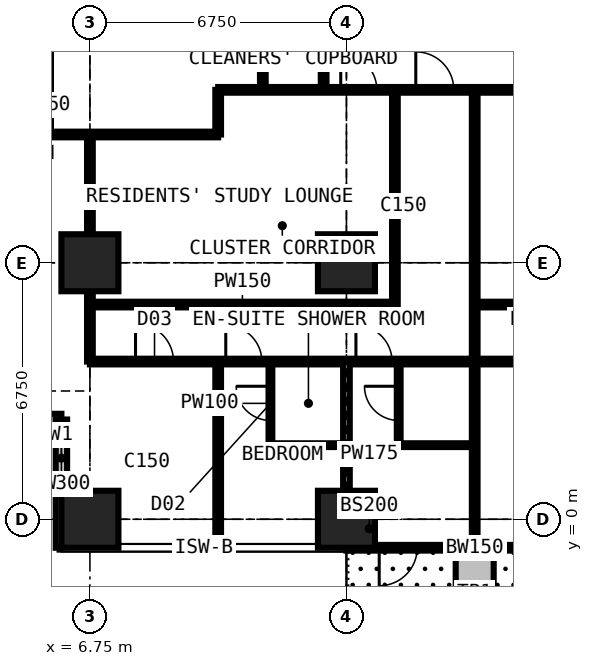
"""IFC4 building model, lengths in metres.
Left out: names, types, materials, properties, quantities, classifications, styles, units other than length and angle.
Written with IfcOpenShell. Run it as: python <this file> out.ifc"""

import sys

from ifc_helpers import new_model, si_unit, direction, frame, frame_2d, origin, origin_2d, place, context, subcontext, project, spatial, rectangle, extrude, element, fill, save


model = new_model("IFC4")
c1 = context("Model", 3, precision=1e-05, world=origin(), true_north=direction((0.0, 1.0)))
c2 = subcontext(c1, "Body", "Model", "MODEL_VIEW")
j1 = project(units=[si_unit("LENGTHUNIT", "METRE"), si_unit("PLANEANGLEUNIT", "RADIAN")], contexts=[c1])
p1 = place(None, origin())
s1 = spatial("IfcSite", under=j1, at=p1, CompositionType="ELEMENT")
p2 = place(p1, origin())
s2 = spatial("IfcBuilding", under=s1, at=p2, CompositionType="ELEMENT")
p3 = place(p2, frame((0.0, 0.0, 130.5)))
s3 = spatial("IfcBuildingStorey", under=s2, at=p3, CompositionType="ELEMENT", Elevation=130.5)
for number, where, z_axis, x_axis in (
    (1, (6.75, 0.0, 0.0), (0.0, 0.0, 1.0), (1.0, 0.0, 0.0)),
    (2, (6.75, 6.75, 0.0), (0.0, 0.0, 1.0), (1.0, 0.0, 0.0)),
    (3, (13.5, 0.0, 0.0), (0.0, 0.0, 1.0), (1.0, 0.0, 0.0)),
    (4, (13.5, 6.75, 0.0), (0.0, 0.0, 1.0), (1.0, 0.0, 0.0)),
):
    element("IfcColumn", number, at=place(p3, frame(where, z_axis=z_axis, x_axis=x_axis)), inside=s3, PredefinedType="COLUMN", context=c2, shape_type="SweptSolid", body=[
        extrude(rectangle(XDim=1.5, YDim=1.5, at=origin_2d()), origin(), (0.0, 0.0, 1.0), 3.6),
    ])
p4 = place(p3, frame((2.625, 2.625, 0.0), z_axis=(0.0, 0.0, 1.0), x_axis=(1.0, 0.0, 0.0)))
e5 = element("IfcWall", 5, at=p4, inside=s3, PredefinedType="SOLIDWALL", context=c2, shape_type="SweptSolid", body=[
    extrude(rectangle(XDim=3.375, YDim=0.3, at=frame_2d((1.688, 0.0))), origin(), (0.0, 0.0, 1.0), 3.375),
])
p5 = place(p4, frame((0.788, 0.0, 0.6)))
e6 = element("IfcOpeningElement", 6, at=p5, cuts=e5, PredefinedType="OPENING", context=c2, shape_type="SweptSolid", body=[
    extrude(rectangle(XDim=1.8, YDim=2.1, at=frame_2d((0.9, 1.05))), frame((0.0, 0.16, 0.0), z_axis=(0.0, -1.0, 0.0), x_axis=(1.0, 0.0, 0.0)), (0.0, 0.0, 1.0), 0.32),
])
p6 = place(p3, frame((6.0, 2.625, 0.0), z_axis=(0.0, 0.0, 1.0), x_axis=(0.0, -1.0, 0.0)))
e7 = element("IfcWall", 7, at=p6, inside=s3, PredefinedType="SOLIDWALL", context=c2, shape_type="SweptSolid", body=[
    extrude(rectangle(XDim=3.375, YDim=0.3, at=frame_2d((1.688, 0.0))), origin(), (0.0, 0.0, 1.0), 3.375),
])
p7 = place(p6, frame((0.268, 0.0, 0.9)))
e8 = element("IfcOpeningElement", 8, at=p7, cuts=e7, PredefinedType="OPENING", context=c2, shape_type="SweptSolid", body=[
    extrude(rectangle(XDim=1.5, YDim=1.8, at=frame_2d((0.75, 0.9))), frame((0.0, 0.16, 0.0), z_axis=(0.0, -1.0, 0.0), x_axis=(1.0, 0.0, 0.0)), (0.0, 0.0, 1.0), 0.32),
])
p8 = place(p3, frame((20.25, -0.75, 0.0), z_axis=(0.0, 0.0, 1.0), x_axis=(-1.0, 0.0, 0.0)))
e9 = element("IfcWall", 9, at=p8, inside=s3, PredefinedType="SOLIDWALL", context=c2, shape_type="SweptSolid", body=[
    extrude(rectangle(XDim=6.75, YDim=0.15, at=frame_2d((3.375, 0.0))), origin(), (0.0, 0.0, 1.0), 3.375),
])
p9 = place(p8, frame((0.863, 0.0, 0.0)))
e10 = element("IfcOpeningElement", 10, at=p9, cuts=e9, PredefinedType="OPENING", context=c2, shape_type="SweptSolid", body=[
    extrude(rectangle(XDim=1.0, YDim=2.2, at=frame_2d((0.5, 1.1))), frame((0.0, 0.085, 0.0), z_axis=(0.0, -1.0, 0.0), x_axis=(1.0, 0.0, 0.0)), (0.0, 0.0, 1.0), 0.17),
])
p10 = place(p8, frame((1.975, 0.0, 0.9)))
e11 = element("IfcOpeningElement", 11, at=p10, cuts=e9, PredefinedType="OPENING", context=c2, shape_type="SweptSolid", body=[
    extrude(rectangle(XDim=1.2, YDim=1.8, at=frame_2d((0.6, 0.9))), frame((0.0, 0.085, 0.0), z_axis=(0.0, -1.0, 0.0), x_axis=(1.0, 0.0, 0.0)), (0.0, 0.0, 1.0), 0.17),
])
p11 = place(p8, frame((4.887, 0.0, 0.0)))
e12 = element("IfcOpeningElement", 12, at=p11, cuts=e9, PredefinedType="OPENING", context=c2, shape_type="SweptSolid", body=[
    extrude(rectangle(XDim=1.0, YDim=2.2, at=frame_2d((0.5, 1.1))), frame((0.0, 0.085, 0.0), z_axis=(0.0, -1.0, 0.0), x_axis=(1.0, 0.0, 0.0)), (0.0, 0.0, 1.0), 0.17),
])
p12 = place(p8, frame((3.575, 0.0, 0.9)))
e13 = element("IfcOpeningElement", 13, at=p12, cuts=e9, PredefinedType="OPENING", context=c2, shape_type="SweptSolid", body=[
    extrude(rectangle(XDim=1.2, YDim=1.8, at=frame_2d((0.6, 0.9))), frame((0.0, 0.085, 0.0), z_axis=(0.0, -1.0, 0.0), x_axis=(1.0, 0.0, 0.0)), (0.0, 0.0, 1.0), 0.17),
])
p13 = place(p3, frame((16.875, -0.85, 0.0), z_axis=(0.0, 0.0, 1.0), x_axis=(0.0, -1.0, 0.0)))
e14 = element("IfcWall", 14, at=p13, inside=s3, PredefinedType="USERDEFINED", context=c2, shape_type="SweptSolid", body=[
    extrude(rectangle(XDim=2.2, YDim=1.0, at=frame_2d((1.1, 0.0))), origin(), (0.0, 0.0, 1.0), 0.9),
])
p14 = place(p3, frame((-0.734, 10.125, 0.0), z_axis=(0.0, 0.0, 1.0), x_axis=(1.0, 0.0, 0.0)))
e15 = element("IfcWall", 15, at=p14, inside=s3, PredefinedType="PARTITIONING", context=c2, shape_type="SweptSolid", body=[
    extrude(rectangle(XDim=10.859, YDim=0.15, at=frame_2d((5.429, 0.0))), origin(), (0.0, 0.0, 1.0), 3.375),
])
p15 = place(p3, frame((6.75, 4.15, 0.0), z_axis=(0.0, 0.0, 1.0), x_axis=(0.0, 1.0, 0.0)))
e16 = element("IfcWall", 16, at=p15, inside=s3, PredefinedType="PARTITIONING", context=c2, shape_type="SweptSolid", body=[
    extrude(rectangle(XDim=5.975, YDim=0.15, at=frame_2d((2.988, 0.0))), origin(), (0.0, 0.0, 1.0), 2.877),
])
p16 = place(p3, frame((6.75, 4.15, 0.0), z_axis=(0.0, 0.0, 1.0), x_axis=(1.0, 0.0, 0.0)))
e17 = element("IfcWall", 17, at=p16, inside=s3, PredefinedType="PARTITIONING", context=c2, shape_type="SweptSolid", body=[
    extrude(rectangle(XDim=23.625, YDim=0.15, at=frame_2d((11.812, 0.0))), origin(), (0.0, 0.0, 1.0), 3.375),
])
p17 = place(p16, frame((1.2, 0.0, 0.0)))
e18 = element("IfcOpeningElement", 18, at=p17, cuts=e17, PredefinedType="OPENING", context=c2, shape_type="SweptSolid", body=[
    extrude(rectangle(XDim=1.0, YDim=2.2, at=frame_2d((0.5, 1.1))), frame((0.0, 0.085, 0.0), z_axis=(0.0, -1.0, 0.0), x_axis=(1.0, 0.0, 0.0)), (0.0, 0.0, 1.0), 0.17),
])
p18 = place(p16, frame((3.575, 0.0, 0.0)))
e19 = element("IfcOpeningElement", 19, at=p18, cuts=e17, PredefinedType="OPENING", context=c2, shape_type="SweptSolid", body=[
    extrude(rectangle(XDim=0.95, YDim=2.2, at=frame_2d((0.475, 1.1))), frame((0.0, 0.085, 0.0), z_axis=(0.0, -1.0, 0.0), x_axis=(1.0, 0.0, 0.0)), (0.0, 0.0, 1.0), 0.17),
])
p19 = place(p16, frame((7.0, 0.0, 0.0)))
e20 = element("IfcOpeningElement", 20, at=p19, cuts=e17, PredefinedType="OPENING", context=c2, shape_type="SweptSolid", body=[
    extrude(rectangle(XDim=0.95, YDim=2.2, at=frame_2d((0.475, 1.1))), frame((0.0, 0.085, 0.0), z_axis=(0.0, -1.0, 0.0), x_axis=(1.0, 0.0, 0.0)), (0.0, 0.0, 1.0), 0.17),
])
p20 = place(p16, frame((18.475, 0.0, 0.0)))
e21 = element("IfcOpeningElement", 21, at=p20, cuts=e17, PredefinedType="OPENING", context=c2, shape_type="SweptSolid", body=[
    extrude(rectangle(XDim=0.95, YDim=2.2, at=frame_2d((0.475, 1.1))), frame((0.0, 0.085, 0.0), z_axis=(0.0, -1.0, 0.0), x_axis=(1.0, 0.0, 0.0)), (0.0, 0.0, 1.0), 0.17),
])
p21 = place(p16, frame((11.725, 0.0, 0.0)))
e22 = element("IfcOpeningElement", 22, at=p21, cuts=e17, PredefinedType="OPENING", context=c2, shape_type="SweptSolid", body=[
    extrude(rectangle(XDim=0.95, YDim=2.2, at=frame_2d((0.475, 1.1))), frame((0.0, 0.085, 0.0), z_axis=(0.0, -1.0, 0.0), x_axis=(1.0, 0.0, 0.0)), (0.0, 0.0, 1.0), 0.17),
])
p22 = place(p3, frame((6.75, 5.65, 0.0), z_axis=(0.0, 0.0, 1.0), x_axis=(1.0, 0.0, 0.0)))
e23 = element("IfcWall", 23, at=p22, inside=s3, PredefinedType="PARTITIONING", context=c2, shape_type="SweptSolid", body=[
    extrude(rectangle(XDim=8.025, YDim=0.15, at=frame_2d((4.012, 0.0))), origin(), (0.0, 0.0, 1.0), 3.375),
])
p23 = place(p3, frame((10.125, -0.734, 0.0), z_axis=(0.0, 0.0, 1.0), x_axis=(0.0, 1.0, 0.0)))
e24 = element("IfcWall", 24, at=p23, inside=s3, PredefinedType="PARTITIONING", context=c2, shape_type="SweptSolid", body=[
    extrude(rectangle(XDim=4.884, YDim=0.15, at=frame_2d((2.442, 0.0))), origin(), (0.0, 0.0, 1.0), 3.375),
])
p24 = place(p3, frame((10.125, 10.125, 0.0), z_axis=(0.0, 0.0, 1.0), x_axis=(0.0, 1.0, 0.0)))
e25 = element("IfcWall", 25, at=p24, inside=s3, PredefinedType="PARTITIONING", context=c2, shape_type="SweptSolid", body=[
    extrude(rectangle(XDim=1.175, YDim=0.15, at=frame_2d((0.587, 0.0))), origin(), (0.0, 0.0, 1.0), 3.375),
])
p25 = place(p3, frame((10.125, 11.3, 0.0), z_axis=(0.0, 0.0, 1.0), x_axis=(1.0, 0.0, 0.0)))
e26 = element("IfcWall", 26, at=p25, inside=s3, PredefinedType="PARTITIONING", context=c2, shape_type="SweptSolid", body=[
    extrude(rectangle(XDim=20.675, YDim=0.15, at=frame_2d((10.337, 0.0))), origin(), (0.0, 0.0, 1.0), 3.375),
])
p26 = place(p25, frame((5.2, 0.0, 0.0)))
e27 = element("IfcOpeningElement", 27, at=p26, cuts=e26, PredefinedType="OPENING", context=c2, shape_type="SweptSolid", body=[
    extrude(rectangle(XDim=1.0, YDim=2.2, at=frame_2d((0.5, 1.1))), frame((0.0, 0.085, 0.0), z_axis=(0.0, -1.0, 0.0), x_axis=(1.0, 0.0, 0.0)), (0.0, 0.0, 1.0), 0.17),
])
p27 = place(p25, frame((11.312, 0.0, 0.0)))
e28 = element("IfcOpeningElement", 28, at=p27, cuts=e26, PredefinedType="OPENING", context=c2, shape_type="SweptSolid", body=[
    extrude(rectangle(XDim=1.0, YDim=2.2, at=frame_2d((0.5, 1.1))), frame((0.0, 0.085, 0.0), z_axis=(0.0, -1.0, 0.0), x_axis=(1.0, 0.0, 0.0)), (0.0, 0.0, 1.0), 0.17),
])
p28 = place(p25, frame((3.225, 0.0, 0.0)))
e29 = element("IfcOpeningElement", 29, at=p28, cuts=e26, PredefinedType="OPENING", context=c2, shape_type="SweptSolid", body=[
    extrude(rectangle(XDim=0.95, YDim=2.2, at=frame_2d((0.475, 1.1))), frame((0.0, 0.085, 0.0), z_axis=(0.0, -1.0, 0.0), x_axis=(1.0, 0.0, 0.0)), (0.0, 0.0, 1.0), 0.17),
])
p29 = place(p3, frame((11.3, 11.3, 0.0), z_axis=(0.0, 0.0, 1.0), x_axis=(0.0, 1.0, 0.0)))
e30 = element("IfcWall", 30, at=p29, inside=s3, PredefinedType="PARTITIONING", context=c2, shape_type="SweptSolid", body=[
    extrude(rectangle(XDim=19.3, YDim=0.15, at=frame_2d((9.65, 0.0))), origin(), (0.0, 0.0, 1.0), 3.375),
])
p30 = place(p29, frame((18.1, 0.0, 0.0)))
e31 = element("IfcOpeningElement", 31, at=p30, cuts=e30, PredefinedType="OPENING", context=c2, shape_type="SweptSolid", body=[
    extrude(rectangle(XDim=1.0, YDim=2.2, at=frame_2d((0.5, 1.1))), frame((0.0, 0.085, 0.0), z_axis=(0.0, -1.0, 0.0), x_axis=(1.0, 0.0, 0.0)), (0.0, 0.0, 1.0), 0.17),
])
p31 = place(p29, frame((10.137, 0.0, 0.0)))
e32 = element("IfcOpeningElement", 32, at=p31, cuts=e30, PredefinedType="OPENING", context=c2, shape_type="SweptSolid", body=[
    extrude(rectangle(XDim=1.0, YDim=2.2, at=frame_2d((0.5, 1.1))), frame((0.0, 0.085, 0.0), z_axis=(0.0, -1.0, 0.0), x_axis=(1.0, 0.0, 0.0)), (0.0, 0.0, 1.0), 0.17),
])
p32 = place(p3, frame((11.5, 1.95, 0.0), z_axis=(0.0, 0.0, 1.0), x_axis=(0.0, 1.0, 0.0)))
e33 = element("IfcWall", 33, at=p32, inside=s3, PredefinedType="PARTITIONING", context=c2, shape_type="SweptSolid", body=[
    extrude(rectangle(XDim=2.2, YDim=0.1, at=frame_2d((1.1, 0.0))), origin(), (0.0, 0.0, 1.0), 3.375),
])
p33 = place(p32, frame((0.65, 0.0, 0.0)))
e34 = element("IfcOpeningElement", 34, at=p33, cuts=e33, PredefinedType="OPENING", context=c2, shape_type="SweptSolid", body=[
    extrude(rectangle(XDim=0.9, YDim=2.2, at=frame_2d((0.45, 1.1))), frame((0.0, 0.06, 0.0), z_axis=(0.0, -1.0, 0.0), x_axis=(1.0, 0.0, 0.0)), (0.0, 0.0, 1.0), 0.12),
])
p34 = place(p3, frame((11.5, 1.95, 0.0), z_axis=(0.0, 0.0, 1.0), x_axis=(1.0, 0.0, 0.0)))
e35 = element("IfcWall", 35, at=p34, inside=s3, PredefinedType="PARTITIONING", context=c2, shape_type="SweptSolid", body=[
    extrude(rectangle(XDim=2.0, YDim=0.1, at=frame_2d((1.0, 0.0))), origin(), (0.0, 0.0, 1.0), 3.375),
])
p35 = place(p3, frame((12.9, 11.3, 0.0), z_axis=(0.0, 0.0, 1.0), x_axis=(0.0, 1.0, 0.0)))
e36 = element("IfcWall", 36, at=p35, inside=s3, PredefinedType="PARTITIONING", context=c2, shape_type="SweptSolid", body=[
    extrude(rectangle(XDim=1.6, YDim=0.15, at=frame_2d((0.8, 0.0))), origin(), (0.0, 0.0, 1.0), 3.375),
])
p36 = place(p3, frame((13.5, -0.734, 0.0), z_axis=(0.0, 0.0, 1.0), x_axis=(0.0, 1.0, 0.0)))
e37 = element("IfcWall", 37, at=p36, inside=s3, PredefinedType="PARTITIONING", context=c2, shape_type="SweptSolid", body=[
    extrude(rectangle(XDim=4.884, YDim=0.175, at=frame_2d((2.442, 0.0))), origin(), (0.0, 0.0, 1.0), 2.877),
])
p37 = place(p3, frame((14.775, 5.65, 0.0), z_axis=(0.0, 0.0, 1.0), x_axis=(0.0, 1.0, 0.0)))
e38 = element("IfcWall", 38, at=p37, inside=s3, PredefinedType="PARTITIONING", context=c2, shape_type="SweptSolid", body=[
    extrude(rectangle(XDim=5.65, YDim=0.15, at=frame_2d((2.825, 0.0))), origin(), (0.0, 0.0, 1.0), 3.375),
])
p38 = place(p3, frame((14.875, 1.95, 0.0), z_axis=(0.0, 0.0, 1.0), x_axis=(0.0, 1.0, 0.0)))
e39 = element("IfcWall", 39, at=p38, inside=s3, PredefinedType="PARTITIONING", context=c2, shape_type="SweptSolid", body=[
    extrude(rectangle(XDim=2.2, YDim=0.1, at=frame_2d((1.1, 0.0))), origin(), (0.0, 0.0, 1.0), 3.375),
])
p39 = place(p38, frame((0.65, 0.0, 0.0)))
e40 = element("IfcOpeningElement", 40, at=p39, cuts=e39, PredefinedType="OPENING", context=c2, shape_type="SweptSolid", body=[
    extrude(rectangle(XDim=0.9, YDim=2.2, at=frame_2d((0.45, 1.1))), frame((0.0, 0.06, 0.0), z_axis=(0.0, -1.0, 0.0), x_axis=(1.0, 0.0, 0.0)), (0.0, 0.0, 1.0), 0.12),
])
p40 = place(p3, frame((14.875, 1.95, 0.0), z_axis=(0.0, 0.0, 1.0), x_axis=(1.0, 0.0, 0.0)))
e41 = element("IfcWall", 41, at=p40, inside=s3, PredefinedType="PARTITIONING", context=c2, shape_type="SweptSolid", body=[
    extrude(rectangle(XDim=2.0, YDim=0.1, at=frame_2d((1.0, 0.0))), origin(), (0.0, 0.0, 1.0), 3.375),
])
p41 = place(p3, frame((16.875, -0.734, 0.0), z_axis=(0.0, 0.0, 1.0), x_axis=(0.0, 1.0, 0.0)))
e42 = element("IfcWall", 42, at=p41, inside=s3, PredefinedType="PARTITIONING", context=c2, shape_type="SweptSolid", body=[
    extrude(rectangle(XDim=12.034, YDim=0.15, at=frame_2d((6.017, 0.0))), origin(), (0.0, 0.0, 1.0), 3.375),
])
p42 = place(p3, frame((16.875, 5.65, 0.0), z_axis=(0.0, 0.0, 1.0), x_axis=(1.0, 0.0, 0.0)))
e43 = element("IfcWall", 43, at=p42, inside=s3, PredefinedType="PARTITIONING", context=c2, shape_type="SweptSolid", body=[
    extrude(rectangle(XDim=4.012, YDim=0.15, at=frame_2d((2.006, 0.0))), origin(), (0.0, 0.0, 1.0), 3.375),
])
p43 = place(p7, origin())
e44 = element("IfcWindow", 44, at=p43, inside=s3, PartitioningType="SINGLE_PANEL", PredefinedType="WINDOW", context=c2, shape_type="SweptSolid", body=[
    extrude(rectangle(XDim=1.5, YDim=1.8, at=frame_2d((0.75, 0.9))), frame((0.0, 0.03, 0.0), z_axis=(0.0, -1.0, 0.0), x_axis=(1.0, 0.0, 0.0)), (0.0, 0.0, 1.0), 0.06),
])
fill(e8, e44)
p44 = place(p10, origin())
e45 = element("IfcWindow", 45, at=p44, inside=s3, PartitioningType="SINGLE_PANEL", PredefinedType="WINDOW", context=c2, shape_type="SweptSolid", body=[
    extrude(rectangle(XDim=1.2, YDim=1.8, at=frame_2d((0.6, 0.9))), frame((0.0, 0.03, 0.0), z_axis=(0.0, -1.0, 0.0), x_axis=(1.0, 0.0, 0.0)), (0.0, 0.0, 1.0), 0.06),
])
fill(e11, e45)
p45 = place(p11, origin())
e46 = element("IfcDoor", 46, at=p45, inside=s3, OperationType="SINGLE_SWING_RIGHT", PredefinedType="DOOR", context=c2, shape_type="SweptSolid", body=[
    extrude(rectangle(XDim=1.0, YDim=2.2, at=frame_2d((0.5, 1.1))), frame((0.0, 0.025, 0.0), z_axis=(0.0, -1.0, 0.0), x_axis=(1.0, 0.0, 0.0)), (0.0, 0.0, 1.0), 0.05),
])
fill(e12, e46)
p46 = place(p12, origin())
e47 = element("IfcWindow", 47, at=p46, inside=s3, PartitioningType="SINGLE_PANEL", PredefinedType="WINDOW", context=c2, shape_type="SweptSolid", body=[
    extrude(rectangle(XDim=1.2, YDim=1.8, at=frame_2d((0.6, 0.9))), frame((0.0, 0.03, 0.0), z_axis=(0.0, -1.0, 0.0), x_axis=(1.0, 0.0, 0.0)), (0.0, 0.0, 1.0), 0.06),
])
fill(e13, e47)
p47 = place(p17, origin())
e48 = element("IfcDoor", 48, at=p47, inside=s3, OperationType="SINGLE_SWING_LEFT", PredefinedType="DOOR", context=c2, shape_type="SweptSolid", body=[
    extrude(rectangle(XDim=1.0, YDim=2.2, at=frame_2d((0.5, 1.1))), frame((0.0, 0.025, 0.0), z_axis=(0.0, -1.0, 0.0), x_axis=(1.0, 0.0, 0.0)), (0.0, 0.0, 1.0), 0.05),
])
fill(e18, e48)
p48 = place(p18, origin())
e49 = element("IfcDoor", 49, at=p48, inside=s3, OperationType="SINGLE_SWING_LEFT", PredefinedType="DOOR", context=c2, shape_type="SweptSolid", body=[
    extrude(rectangle(XDim=0.95, YDim=2.2, at=frame_2d((0.475, 1.1))), frame((0.0, 0.025, 0.0), z_axis=(0.0, -1.0, 0.0), x_axis=(1.0, 0.0, 0.0)), (0.0, 0.0, 1.0), 0.05),
])
fill(e19, e49)
p49 = place(p33, origin())
e50 = element("IfcDoor", 50, at=p49, inside=s3, OperationType="SINGLE_SWING_RIGHT", PredefinedType="DOOR", context=c2, shape_type="SweptSolid", body=[
    extrude(rectangle(XDim=0.9, YDim=2.2, at=frame_2d((0.45, 1.1))), frame((0.0, 0.025, 0.0), z_axis=(0.0, -1.0, 0.0), x_axis=(1.0, 0.0, 0.0)), (0.0, 0.0, 1.0), 0.05),
])
fill(e34, e50)
p50 = place(p19, origin())
e51 = element("IfcDoor", 51, at=p50, inside=s3, OperationType="SINGLE_SWING_LEFT", PredefinedType="DOOR", context=c2, shape_type="SweptSolid", body=[
    extrude(rectangle(XDim=0.95, YDim=2.2, at=frame_2d((0.475, 1.1))), frame((0.0, 0.025, 0.0), z_axis=(0.0, -1.0, 0.0), x_axis=(1.0, 0.0, 0.0)), (0.0, 0.0, 1.0), 0.05),
])
fill(e20, e51)
p51 = place(p39, origin())
e52 = element("IfcDoor", 52, at=p51, inside=s3, OperationType="SINGLE_SWING_RIGHT", PredefinedType="DOOR", context=c2, shape_type="SweptSolid", body=[
    extrude(rectangle(XDim=0.9, YDim=2.2, at=frame_2d((0.45, 1.1))), frame((0.0, 0.025, 0.0), z_axis=(0.0, -1.0, 0.0), x_axis=(1.0, 0.0, 0.0)), (0.0, 0.0, 1.0), 0.05),
])
fill(e40, e52)
p52 = place(p26, origin())
e53 = element("IfcDoor", 53, at=p52, inside=s3, OperationType="SINGLE_SWING_LEFT", PredefinedType="DOOR", context=c2, shape_type="SweptSolid", body=[
    extrude(rectangle(XDim=1.0, YDim=2.2, at=frame_2d((0.5, 1.1))), frame((0.0, 0.025, 0.0), z_axis=(0.0, -1.0, 0.0), x_axis=(1.0, 0.0, 0.0)), (0.0, 0.0, 1.0), 0.05),
])
fill(e27, e53)
p53 = place(p28, origin())
e54 = element("IfcDoor", 54, at=p53, inside=s3, OperationType="SINGLE_SWING_LEFT", PredefinedType="DOOR", context=c2, shape_type="SweptSolid", body=[
    extrude(rectangle(XDim=0.95, YDim=2.2, at=frame_2d((0.475, 1.1))), frame((0.0, 0.025, 0.0), z_axis=(0.0, -1.0, 0.0), x_axis=(1.0, 0.0, 0.0)), (0.0, 0.0, 1.0), 0.05),
])
fill(e29, e54)
save(model, sys.argv[1])
